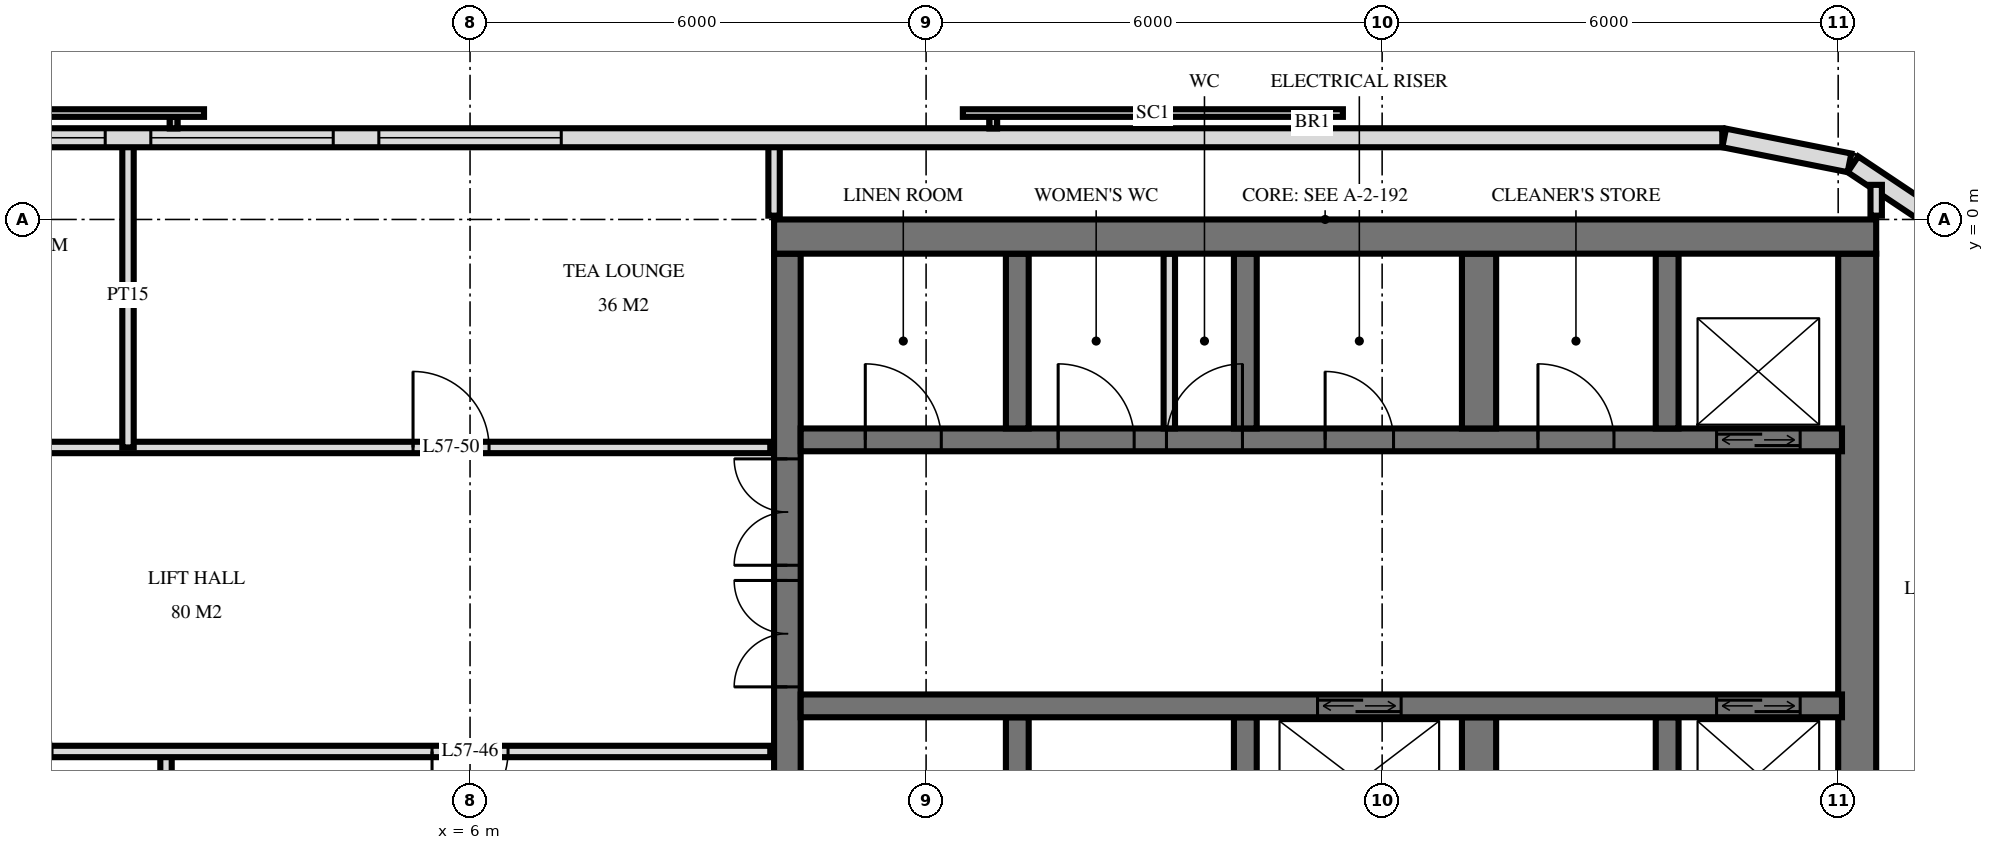
"""IFC4 building model, lengths in metres.
Left out: names, types, materials, properties, quantities, classifications, styles, units other than length and angle.
Written with IfcOpenShell. Run it as: python <this file> out.ifc"""

import sys

from ifc_helpers import new_model, si_unit, direction, frame, frame_2d, origin, place, context, subcontext, project, spatial, rectangle, extrude, element, fill, save


model = new_model("IFC4")
c1 = context("Model", 3, precision=1e-05, world=origin(), true_north=direction((0.0, 1.0)))
c2 = subcontext(c1, "Body", "Model", "MODEL_VIEW")
j1 = project(units=[si_unit("LENGTHUNIT", "METRE"), si_unit("PLANEANGLEUNIT", "RADIAN")], contexts=[c1])
p1 = place(None, origin())
s1 = spatial("IfcSite", under=j1, at=p1, CompositionType="ELEMENT")
p2 = place(p1, origin())
s2 = spatial("IfcBuilding", under=s1, at=p2, CompositionType="ELEMENT")
p3 = place(p2, frame((0.0, 0.0, 218.6)))
s3 = spatial("IfcBuildingStorey", under=s2, at=p3, CompositionType="ELEMENT", Elevation=218.6)
p4 = place(p3, frame((10.0, -0.225, 0.0), z_axis=(0.0, 0.0, 1.0), x_axis=(1.0, 0.0, 0.0)))
e1 = element("IfcWall", 1, at=p4, inside=s3, PredefinedType="SHEAR", context=c2, shape_type="SweptSolid", body=[
    extrude(rectangle(XDim=14.5, YDim=0.45, at=frame_2d((7.25, 0.0))), origin(), (0.0, 0.0, 1.0), 3.5),
])
p5 = place(p3, frame((10.175, -14.55, 0.0), z_axis=(0.0, 0.0, 1.0), x_axis=(0.0, 1.0, 0.0)))
e2 = element("IfcWall", 2, at=p5, inside=s3, PredefinedType="SHEAR", context=c2, shape_type="SweptSolid", body=[
    extrude(rectangle(XDim=14.1, YDim=0.35, at=frame_2d((7.05, 0.0))), origin(), (0.0, 0.0, 1.0), 3.5),
])
p6 = place(p5, frame((8.4, 0.0, 0.0)))
e3 = element("IfcOpeningElement", 3, at=p6, cuts=e2, PredefinedType="OPENING", context=c2, shape_type="SweptSolid", body=[
    extrude(rectangle(XDim=1.4, YDim=2.4, at=frame_2d((0.7, 1.2))), frame((0.0, 0.185, 0.0), z_axis=(0.0, -1.0, 0.0), x_axis=(1.0, 0.0, 0.0)), (0.0, 0.0, 1.0), 0.37),
])
p7 = place(p5, frame((10.0, 0.0, 0.0)))
e4 = element("IfcOpeningElement", 4, at=p7, cuts=e2, PredefinedType="OPENING", context=c2, shape_type="SweptSolid", body=[
    extrude(rectangle(XDim=1.4, YDim=2.4, at=frame_2d((0.7, 1.2))), frame((0.0, 0.185, 0.0), z_axis=(0.0, -1.0, 0.0), x_axis=(1.0, 0.0, 0.0)), (0.0, 0.0, 1.0), 0.37),
])
p8 = place(p5, frame((4.0, 0.0, 0.0)))
e5 = element("IfcOpeningElement", 5, at=p8, cuts=e2, PredefinedType="OPENING", context=c2, shape_type="SweptSolid", body=[
    extrude(rectangle(XDim=1.2, YDim=2.1, at=frame_2d((0.6, 1.05))), frame((0.0, 0.185, 0.0), z_axis=(0.0, -1.0, 0.0), x_axis=(1.0, 0.0, 0.0)), (0.0, 0.0, 1.0), 0.37),
])
p9 = place(p3, frame((24.25, -14.55, 0.0), z_axis=(0.0, 0.0, 1.0), x_axis=(0.0, 1.0, 0.0)))
e6 = element("IfcWall", 6, at=p9, inside=s3, PredefinedType="SHEAR", context=c2, shape_type="SweptSolid", body=[
    extrude(rectangle(XDim=14.1, YDim=0.5, at=frame_2d((7.05, 0.0))), origin(), (0.0, 0.0, 1.0), 3.5),
])
p10 = place(p3, frame((10.35, -2.9, 0.0), z_axis=(0.0, 0.0, 1.0), x_axis=(1.0, 0.0, 0.0)))
e7 = element("IfcWall", 7, at=p10, inside=s3, PredefinedType="SHEAR", context=c2, shape_type="SweptSolid", body=[
    extrude(rectangle(XDim=13.7, YDim=0.3, at=frame_2d((6.85, 0.0))), origin(), (0.0, 0.0, 1.0), 3.5),
])
p11 = place(p10, frame((12.05, 0.0, 0.0)))
e8 = element("IfcOpeningElement", 8, at=p11, cuts=e7, PredefinedType="OPENING", context=c2, shape_type="SweptSolid", body=[
    extrude(rectangle(XDim=1.1, YDim=2.1, at=frame_2d((0.55, 1.05))), frame((0.0, 0.16, 0.0), z_axis=(0.0, -1.0, 0.0), x_axis=(1.0, 0.0, 0.0)), (0.0, 0.0, 1.0), 0.32),
])
p12 = place(p10, frame((6.9, 0.0, 0.0)))
e9 = element("IfcOpeningElement", 9, at=p12, cuts=e7, PredefinedType="OPENING", context=c2, shape_type="SweptSolid", body=[
    extrude(rectangle(XDim=0.9, YDim=2.1, at=frame_2d((0.45, 1.05))), frame((0.0, 0.16, 0.0), z_axis=(0.0, -1.0, 0.0), x_axis=(1.0, 0.0, 0.0)), (0.0, 0.0, 1.0), 0.32),
])
p13 = place(p10, frame((0.85, 0.0, 0.0)))
e10 = element("IfcOpeningElement", 10, at=p13, cuts=e7, PredefinedType="OPENING", context=c2, shape_type="SweptSolid", body=[
    extrude(rectangle(XDim=1.0, YDim=2.1, at=frame_2d((0.5, 1.05))), frame((0.0, 0.16, 0.0), z_axis=(0.0, -1.0, 0.0), x_axis=(1.0, 0.0, 0.0)), (0.0, 0.0, 1.0), 0.32),
])
p14 = place(p10, frame((3.387, 0.0, 0.0)))
e11 = element("IfcOpeningElement", 11, at=p14, cuts=e7, PredefinedType="OPENING", context=c2, shape_type="SweptSolid", body=[
    extrude(rectangle(XDim=1.0, YDim=2.1, at=frame_2d((0.5, 1.05))), frame((0.0, 0.16, 0.0), z_axis=(0.0, -1.0, 0.0), x_axis=(1.0, 0.0, 0.0)), (0.0, 0.0, 1.0), 0.32),
])
p15 = place(p10, frame((4.812, 0.0, 0.0)))
e12 = element("IfcOpeningElement", 12, at=p15, cuts=e7, PredefinedType="OPENING", context=c2, shape_type="SweptSolid", body=[
    extrude(rectangle(XDim=1.0, YDim=2.1, at=frame_2d((0.5, 1.05))), frame((0.0, 0.16, 0.0), z_axis=(0.0, -1.0, 0.0), x_axis=(1.0, 0.0, 0.0)), (0.0, 0.0, 1.0), 0.32),
])
p16 = place(p10, frame((9.7, 0.0, 0.0)))
e13 = element("IfcOpeningElement", 13, at=p16, cuts=e7, PredefinedType="OPENING", context=c2, shape_type="SweptSolid", body=[
    extrude(rectangle(XDim=1.0, YDim=2.1, at=frame_2d((0.5, 1.05))), frame((0.0, 0.16, 0.0), z_axis=(0.0, -1.0, 0.0), x_axis=(1.0, 0.0, 0.0)), (0.0, 0.0, 1.0), 0.32),
])
p17 = place(p3, frame((10.35, -6.4, 0.0), z_axis=(0.0, 0.0, 1.0), x_axis=(1.0, 0.0, 0.0)))
e14 = element("IfcWall", 14, at=p17, inside=s3, PredefinedType="SHEAR", context=c2, shape_type="SweptSolid", body=[
    extrude(rectangle(XDim=13.7, YDim=0.3, at=frame_2d((6.85, 0.0))), origin(), (0.0, 0.0, 1.0), 3.5),
])
p18 = place(p17, frame((12.05, 0.0, 0.0)))
e15 = element("IfcOpeningElement", 15, at=p18, cuts=e14, PredefinedType="OPENING", context=c2, shape_type="SweptSolid", body=[
    extrude(rectangle(XDim=1.1, YDim=2.1, at=frame_2d((0.55, 1.05))), frame((0.0, 0.16, 0.0), z_axis=(0.0, -1.0, 0.0), x_axis=(1.0, 0.0, 0.0)), (0.0, 0.0, 1.0), 0.32),
])
p19 = place(p17, frame((6.8, 0.0, 0.0)))
e16 = element("IfcOpeningElement", 16, at=p19, cuts=e14, PredefinedType="OPENING", context=c2, shape_type="SweptSolid", body=[
    extrude(rectangle(XDim=1.1, YDim=2.1, at=frame_2d((0.55, 1.05))), frame((0.0, 0.16, 0.0), z_axis=(0.0, -1.0, 0.0), x_axis=(1.0, 0.0, 0.0)), (0.0, 0.0, 1.0), 0.32),
])
for number, where, z_axis, x_axis in (
    (17, (13.2, -2.75, 0.0), (0.0, 0.0, 1.0), (0.0, 1.0, 0.0)),
    (18, (13.2, -8.85, 0.0), (0.0, 0.0, 1.0), (0.0, 1.0, 0.0)),
    (19, (16.2, -2.75, 0.0), (0.0, 0.0, 1.0), (0.0, 1.0, 0.0)),
    (20, (16.2, -8.85, 0.0), (0.0, 0.0, 1.0), (0.0, 1.0, 0.0)),
):
    element("IfcWall", number, at=place(p3, frame(where, z_axis=z_axis, x_axis=x_axis)), inside=s3, PredefinedType="SHEAR", context=c2, shape_type="SweptSolid", body=[
        extrude(rectangle(XDim=2.3, YDim=0.3, at=frame_2d((1.15, 0.0))), origin(), (0.0, 0.0, 1.0), 3.5),
    ])
for number, where, z_axis, x_axis in (
    (21, (19.275, -2.75, 0.0), (0.0, 0.0, 1.0), (0.0, 1.0, 0.0)),
    (22, (19.275, -8.85, 0.0), (0.0, 0.0, 1.0), (0.0, 1.0, 0.0)),
):
    element("IfcWall", number, at=place(p3, frame(where, z_axis=z_axis, x_axis=x_axis)), inside=s3, PredefinedType="SHEAR", context=c2, shape_type="SweptSolid", body=[
        extrude(rectangle(XDim=2.3, YDim=0.45, at=frame_2d((1.15, 0.0))), origin(), (0.0, 0.0, 1.0), 3.5),
    ])
for number, where, z_axis, x_axis in (
    (23, (21.75, -2.75, 0.0), (0.0, 0.0, 1.0), (0.0, 1.0, 0.0)),
    (24, (21.75, -8.85, 0.0), (0.0, 0.0, 1.0), (0.0, 1.0, 0.0)),
):
    element("IfcWall", number, at=place(p3, frame(where, z_axis=z_axis, x_axis=x_axis)), inside=s3, PredefinedType="SHEAR", context=c2, shape_type="SweptSolid", body=[
        extrude(rectangle(XDim=2.3, YDim=0.3, at=frame_2d((1.15, 0.0))), origin(), (0.0, 0.0, 1.0), 3.5),
    ])
p20 = place(p3, frame((25.571, -0.194, 0.0), z_axis=(0.0, 0.0, 1.0), x_axis=(-0.831482937015, 0.55555029066, 0.0)))
e25 = element("IfcWall", 25, at=p20, inside=s3, PredefinedType="SOLIDWALL", context=c2, shape_type="SweptSolid", body=[
    extrude(rectangle(XDim=1.656, YDim=0.25, at=frame_2d((0.828, 0.0))), origin(), (0.0, 0.0, 1.0), 3.22),
])
p21 = place(p3, frame((24.149, 0.745, 0.0), z_axis=(0.0, 0.0, 1.0), x_axis=(-0.980803419081, 0.194999110559, 0.0)))
e26 = element("IfcWall", 26, at=p21, inside=s3, PredefinedType="SOLIDWALL", context=c2, shape_type="SweptSolid", body=[
    extrude(rectangle(XDim=1.681, YDim=0.25, at=frame_2d((0.841, 0.0))), origin(), (0.0, 0.0, 1.0), 3.22),
])
p22 = place(p3, frame((22.475, 1.075, 0.0), z_axis=(0.0, 0.0, 1.0), x_axis=(-1.0, 0.0, 0.0)))
e27 = element("IfcWall", 27, at=p22, inside=s3, PredefinedType="SOLIDWALL", context=c2, shape_type="SweptSolid", body=[
    extrude(rectangle(XDim=44.951, YDim=0.25, at=frame_2d((22.475, 0.0))), origin(), (0.0, 0.0, 1.0), 3.22),
])
p23 = place(p22, frame((15.275, 0.0, 0.9)))
e28 = element("IfcOpeningElement", 28, at=p23, cuts=e27, PredefinedType="OPENING", context=c2, shape_type="SweptSolid", body=[
    extrude(rectangle(XDim=2.4, YDim=1.5, at=frame_2d((1.2, 0.75))), frame((0.0, 0.135, 0.0), z_axis=(0.0, -1.0, 0.0), x_axis=(1.0, 0.0, 0.0)), (0.0, 0.0, 1.0), 0.27),
])
p24 = place(p22, frame((18.275, 0.0, 0.9)))
e29 = element("IfcOpeningElement", 29, at=p24, cuts=e27, PredefinedType="OPENING", context=c2, shape_type="SweptSolid", body=[
    extrude(rectangle(XDim=2.4, YDim=1.5, at=frame_2d((1.2, 0.75))), frame((0.0, 0.135, 0.0), z_axis=(0.0, -1.0, 0.0), x_axis=(1.0, 0.0, 0.0)), (0.0, 0.0, 1.0), 0.27),
])
p25 = place(p22, frame((21.275, 0.0, 0.9)))
e30 = element("IfcOpeningElement", 30, at=p25, cuts=e27, PredefinedType="OPENING", context=c2, shape_type="SweptSolid", body=[
    extrude(rectangle(XDim=2.4, YDim=1.5, at=frame_2d((1.2, 0.75))), frame((0.0, 0.135, 0.0), z_axis=(0.0, -1.0, 0.0), x_axis=(1.0, 0.0, 0.0)), (0.0, 0.0, 1.0), 0.27),
])
p26 = place(p22, frame((24.275, 0.0, 0.9)))
e31 = element("IfcOpeningElement", 31, at=p26, cuts=e27, PredefinedType="OPENING", context=c2, shape_type="SweptSolid", body=[
    extrude(rectangle(XDim=2.4, YDim=1.5, at=frame_2d((1.2, 0.75))), frame((0.0, 0.135, 0.0), z_axis=(0.0, -1.0, 0.0), x_axis=(1.0, 0.0, 0.0)), (0.0, 0.0, 1.0), 0.27),
])
p27 = place(p3, frame((15.2, -2.75, 0.0), z_axis=(0.0, 0.0, 1.0), x_axis=(0.0, 1.0, 0.0)))
e32 = element("IfcWall", 32, at=p27, inside=s3, PredefinedType="PARTITIONING", context=c2, shape_type="SweptSolid", body=[
    extrude(rectangle(XDim=2.3, YDim=0.15, at=frame_2d((1.15, 0.0))), origin(), (0.0, 0.0, 1.0), 3.2),
])
p28 = place(p3, frame((24.5, 0.05, 0.0), z_axis=(0.0, 0.0, 1.0), x_axis=(0.0, 1.0, 0.0)))
e33 = element("IfcWall", 33, at=p28, inside=s3, PredefinedType="PARTITIONING", context=c2, shape_type="SweptSolid", body=[
    extrude(rectangle(XDim=0.405, YDim=0.15, at=frame_2d((0.203, 0.0))), origin(), (0.0, 0.0, 1.0), 3.22),
])
p29 = place(p3, frame((10.0, 0.05, 0.0), z_axis=(0.0, 0.0, 1.0), x_axis=(0.0, 1.0, 0.0)))
e34 = element("IfcWall", 34, at=p29, inside=s3, PredefinedType="PARTITIONING", context=c2, shape_type="SweptSolid", body=[
    extrude(rectangle(XDim=0.97, YDim=0.15, at=frame_2d((0.485, 0.0))), origin(), (0.0, 0.0, 1.0), 3.22),
])
p30 = place(p3, frame((2.0, -11.0, 0.0), z_axis=(0.0, 0.0, 1.0), x_axis=(0.0, 1.0, 0.0)))
e35 = element("IfcWall", 35, at=p30, inside=s3, PredefinedType="PARTITIONING", context=c2, shape_type="SweptSolid", body=[
    extrude(rectangle(XDim=4.0, YDim=0.15, at=frame_2d((2.0, 0.0))), origin(), (0.0, 0.0, 1.0), 3.22),
])
p31 = place(p3, frame((1.5, -3.0, 0.0), z_axis=(0.0, 0.0, 1.0), x_axis=(0.0, 1.0, 0.0)))
e36 = element("IfcWall", 36, at=p31, inside=s3, PredefinedType="PARTITIONING", context=c2, shape_type="SweptSolid", body=[
    extrude(rectangle(XDim=4.02, YDim=0.15, at=frame_2d((2.01, 0.0))), origin(), (0.0, 0.0, 1.0), 3.22),
])
p32 = place(p3, frame((-9.95, -7.0, 0.0), z_axis=(0.0, 0.0, 1.0), x_axis=(1.0, 0.0, 0.0)))
e37 = element("IfcWall", 37, at=p32, inside=s3, PredefinedType="PARTITIONING", context=c2, shape_type="SweptSolid", body=[
    extrude(rectangle(XDim=19.9, YDim=0.15, at=frame_2d((9.95, 0.0))), origin(), (0.0, 0.0, 1.0), 3.22),
])
p33 = place(p32, frame((9.45, 0.0, 0.0)))
e38 = element("IfcOpeningElement", 38, at=p33, cuts=e37, PredefinedType="OPENING", context=c2, shape_type="SweptSolid", body=[
    extrude(rectangle(XDim=1.0, YDim=2.1, at=frame_2d((0.5, 1.05))), frame((0.0, 0.085, 0.0), z_axis=(0.0, -1.0, 0.0), x_axis=(1.0, 0.0, 0.0)), (0.0, 0.0, 1.0), 0.17),
])
p34 = place(p32, frame((15.45, 0.0, 0.0)))
e39 = element("IfcOpeningElement", 39, at=p34, cuts=e37, PredefinedType="OPENING", context=c2, shape_type="SweptSolid", body=[
    extrude(rectangle(XDim=1.0, YDim=2.1, at=frame_2d((0.5, 1.05))), frame((0.0, 0.085, 0.0), z_axis=(0.0, -1.0, 0.0), x_axis=(1.0, 0.0, 0.0)), (0.0, 0.0, 1.0), 0.17),
])
p35 = place(p3, frame((-9.95, -3.0, 0.0), z_axis=(0.0, 0.0, 1.0), x_axis=(1.0, 0.0, 0.0)))
e40 = element("IfcWall", 40, at=p35, inside=s3, PredefinedType="PARTITIONING", context=c2, shape_type="SweptSolid", body=[
    extrude(rectangle(XDim=19.9, YDim=0.15, at=frame_2d((9.95, 0.0))), origin(), (0.0, 0.0, 1.0), 3.22),
])
p36 = place(p35, frame((0.95, 0.0, 0.0)))
e41 = element("IfcOpeningElement", 41, at=p36, cuts=e40, PredefinedType="OPENING", context=c2, shape_type="SweptSolid", body=[
    extrude(rectangle(XDim=1.0, YDim=2.1, at=frame_2d((0.5, 1.05))), frame((0.0, 0.085, 0.0), z_axis=(0.0, -1.0, 0.0), x_axis=(1.0, 0.0, 0.0)), (0.0, 0.0, 1.0), 0.17),
])
p37 = place(p35, frame((3.7, 0.0, 0.0)))
e42 = element("IfcOpeningElement", 42, at=p37, cuts=e40, PredefinedType="OPENING", context=c2, shape_type="SweptSolid", body=[
    extrude(rectangle(XDim=1.0, YDim=2.1, at=frame_2d((0.5, 1.05))), frame((0.0, 0.085, 0.0), z_axis=(0.0, -1.0, 0.0), x_axis=(1.0, 0.0, 0.0)), (0.0, 0.0, 1.0), 0.17),
])
p38 = place(p35, frame((7.95, 0.0, 0.0)))
e43 = element("IfcOpeningElement", 43, at=p38, cuts=e40, PredefinedType="OPENING", context=c2, shape_type="SweptSolid", body=[
    extrude(rectangle(XDim=1.0, YDim=2.1, at=frame_2d((0.5, 1.05))), frame((0.0, 0.085, 0.0), z_axis=(0.0, -1.0, 0.0), x_axis=(1.0, 0.0, 0.0)), (0.0, 0.0, 1.0), 0.17),
])
p39 = place(p35, frame((15.2, 0.0, 0.0)))
e44 = element("IfcOpeningElement", 44, at=p39, cuts=e40, PredefinedType="OPENING", context=c2, shape_type="SweptSolid", body=[
    extrude(rectangle(XDim=1.0, YDim=2.1, at=frame_2d((0.5, 1.05))), frame((0.0, 0.085, 0.0), z_axis=(0.0, -1.0, 0.0), x_axis=(1.0, 0.0, 0.0)), (0.0, 0.0, 1.0), 0.17),
])
p40 = place(p23, origin())
e45 = element("IfcWindow", 45, at=p40, inside=s3, PartitioningType="SINGLE_PANEL", PredefinedType="WINDOW", context=c2, shape_type="SweptSolid", body=[
    extrude(rectangle(XDim=2.4, YDim=1.5, at=frame_2d((1.2, 0.75))), frame((0.0, 0.03, 0.0), z_axis=(0.0, -1.0, 0.0), x_axis=(1.0, 0.0, 0.0)), (0.0, 0.0, 1.0), 0.06),
])
fill(e28, e45)
p41 = place(p24, origin())
e46 = element("IfcWindow", 46, at=p41, inside=s3, PartitioningType="SINGLE_PANEL", PredefinedType="WINDOW", context=c2, shape_type="SweptSolid", body=[
    extrude(rectangle(XDim=2.4, YDim=1.5, at=frame_2d((1.2, 0.75))), frame((0.0, 0.03, 0.0), z_axis=(0.0, -1.0, 0.0), x_axis=(1.0, 0.0, 0.0)), (0.0, 0.0, 1.0), 0.06),
])
fill(e29, e46)
p42 = place(p25, origin())
e47 = element("IfcWindow", 47, at=p42, inside=s3, PartitioningType="SINGLE_PANEL", PredefinedType="WINDOW", context=c2, shape_type="SweptSolid", body=[
    extrude(rectangle(XDim=2.4, YDim=1.5, at=frame_2d((1.2, 0.75))), frame((0.0, 0.03, 0.0), z_axis=(0.0, -1.0, 0.0), x_axis=(1.0, 0.0, 0.0)), (0.0, 0.0, 1.0), 0.06),
])
fill(e30, e47)
p43 = place(p11, origin())
e48 = element("IfcDoor", 48, at=p43, inside=s3, OperationType="DOUBLE_DOOR_SLIDING", PredefinedType="USERDEFINED", context=c2, shape_type="SweptSolid", body=[
    extrude(rectangle(XDim=1.1, YDim=2.1, at=frame_2d((0.55, 1.05))), frame((0.0, 0.025, 0.0), z_axis=(0.0, -1.0, 0.0), x_axis=(1.0, 0.0, 0.0)), (0.0, 0.0, 1.0), 0.05),
])
fill(e8, e48)
p44 = place(p18, origin())
e49 = element("IfcDoor", 49, at=p44, inside=s3, OperationType="DOUBLE_DOOR_SLIDING", PredefinedType="USERDEFINED", context=c2, shape_type="SweptSolid", body=[
    extrude(rectangle(XDim=1.1, YDim=2.1, at=frame_2d((0.55, 1.05))), frame((0.0, 0.025, 0.0), z_axis=(0.0, -1.0, 0.0), x_axis=(1.0, 0.0, 0.0)), (0.0, 0.0, 1.0), 0.05),
])
fill(e15, e49)
p45 = place(p19, origin())
e50 = element("IfcDoor", 50, at=p45, inside=s3, OperationType="DOUBLE_DOOR_SLIDING", PredefinedType="USERDEFINED", context=c2, shape_type="SweptSolid", body=[
    extrude(rectangle(XDim=1.1, YDim=2.1, at=frame_2d((0.55, 1.05))), frame((0.0, 0.025, 0.0), z_axis=(0.0, -1.0, 0.0), x_axis=(1.0, 0.0, 0.0)), (0.0, 0.0, 1.0), 0.05),
])
fill(e16, e50)
p46 = place(p6, origin())
e51 = element("IfcDoor", 51, at=p46, inside=s3, OperationType="DOUBLE_DOOR_SINGLE_SWING", PredefinedType="DOOR", context=c2, shape_type="SweptSolid", body=[
    extrude(rectangle(XDim=1.4, YDim=2.4, at=frame_2d((0.7, 1.2))), frame((0.0, 0.025, 0.0), z_axis=(0.0, -1.0, 0.0), x_axis=(1.0, 0.0, 0.0)), (0.0, 0.0, 1.0), 0.05),
])
fill(e3, e51)
p47 = place(p7, origin())
e52 = element("IfcDoor", 52, at=p47, inside=s3, OperationType="DOUBLE_DOOR_SINGLE_SWING", PredefinedType="DOOR", context=c2, shape_type="SweptSolid", body=[
    extrude(rectangle(XDim=1.4, YDim=2.4, at=frame_2d((0.7, 1.2))), frame((0.0, 0.025, 0.0), z_axis=(0.0, -1.0, 0.0), x_axis=(1.0, 0.0, 0.0)), (0.0, 0.0, 1.0), 0.05),
])
fill(e4, e52)
p48 = place(p12, origin())
e53 = element("IfcDoor", 53, at=p48, inside=s3, OperationType="SINGLE_SWING_RIGHT", PredefinedType="DOOR", context=c2, shape_type="SweptSolid", body=[
    extrude(rectangle(XDim=0.9, YDim=2.1, at=frame_2d((0.45, 1.05))), frame((0.0, 0.025, 0.0), z_axis=(0.0, -1.0, 0.0), x_axis=(1.0, 0.0, 0.0)), (0.0, 0.0, 1.0), 0.05),
])
fill(e9, e53)
p49 = place(p13, origin())
e54 = element("IfcDoor", 54, at=p49, inside=s3, OperationType="SINGLE_SWING_RIGHT", PredefinedType="DOOR", context=c2, shape_type="SweptSolid", body=[
    extrude(rectangle(XDim=1.0, YDim=2.1, at=frame_2d((0.5, 1.05))), frame((0.0, 0.025, 0.0), z_axis=(0.0, -1.0, 0.0), x_axis=(1.0, 0.0, 0.0)), (0.0, 0.0, 1.0), 0.05),
])
fill(e10, e54)
p50 = place(p14, origin())
e55 = element("IfcDoor", 55, at=p50, inside=s3, OperationType="SINGLE_SWING_RIGHT", PredefinedType="DOOR", context=c2, shape_type="SweptSolid", body=[
    extrude(rectangle(XDim=1.0, YDim=2.1, at=frame_2d((0.5, 1.05))), frame((0.0, 0.025, 0.0), z_axis=(0.0, -1.0, 0.0), x_axis=(1.0, 0.0, 0.0)), (0.0, 0.0, 1.0), 0.05),
])
fill(e11, e55)
p51 = place(p15, origin())
e56 = element("IfcDoor", 56, at=p51, inside=s3, OperationType="SINGLE_SWING_LEFT", PredefinedType="DOOR", context=c2, shape_type="SweptSolid", body=[
    extrude(rectangle(XDim=1.0, YDim=2.1, at=frame_2d((0.5, 1.05))), frame((0.0, 0.025, 0.0), z_axis=(0.0, -1.0, 0.0), x_axis=(1.0, 0.0, 0.0)), (0.0, 0.0, 1.0), 0.05),
])
fill(e12, e56)
p52 = place(p16, origin())
e57 = element("IfcDoor", 57, at=p52, inside=s3, OperationType="SINGLE_SWING_RIGHT", PredefinedType="DOOR", context=c2, shape_type="SweptSolid", body=[
    extrude(rectangle(XDim=1.0, YDim=2.1, at=frame_2d((0.5, 1.05))), frame((0.0, 0.025, 0.0), z_axis=(0.0, -1.0, 0.0), x_axis=(1.0, 0.0, 0.0)), (0.0, 0.0, 1.0), 0.05),
])
fill(e13, e57)
p53 = place(p34, frame((0.5, 0.0, 0.0), z_axis=(0.0, 0.0, 1.0), x_axis=(-1.0, 0.0, 0.0)))
e58 = element("IfcDoor", 58, at=p53, inside=s3, OperationType="SINGLE_SWING_LEFT", PredefinedType="DOOR", context=c2, shape_type="SweptSolid", body=[
    extrude(rectangle(XDim=1.0, YDim=2.1, at=frame_2d((0.0, 1.05))), frame((0.0, -0.025, 0.0), z_axis=(0.0, 1.0, 0.0), x_axis=(-1.0, 0.0, 0.0)), (0.0, 0.0, 1.0), 0.05),
])
fill(e39, e58)
p54 = place(p39, origin())
e59 = element("IfcDoor", 59, at=p54, inside=s3, OperationType="SINGLE_SWING_RIGHT", PredefinedType="DOOR", context=c2, shape_type="SweptSolid", body=[
    extrude(rectangle(XDim=1.0, YDim=2.1, at=frame_2d((0.5, 1.05))), frame((0.0, 0.025, 0.0), z_axis=(0.0, -1.0, 0.0), x_axis=(1.0, 0.0, 0.0)), (0.0, 0.0, 1.0), 0.05),
])
fill(e44, e59)
save(model, sys.argv[1])
